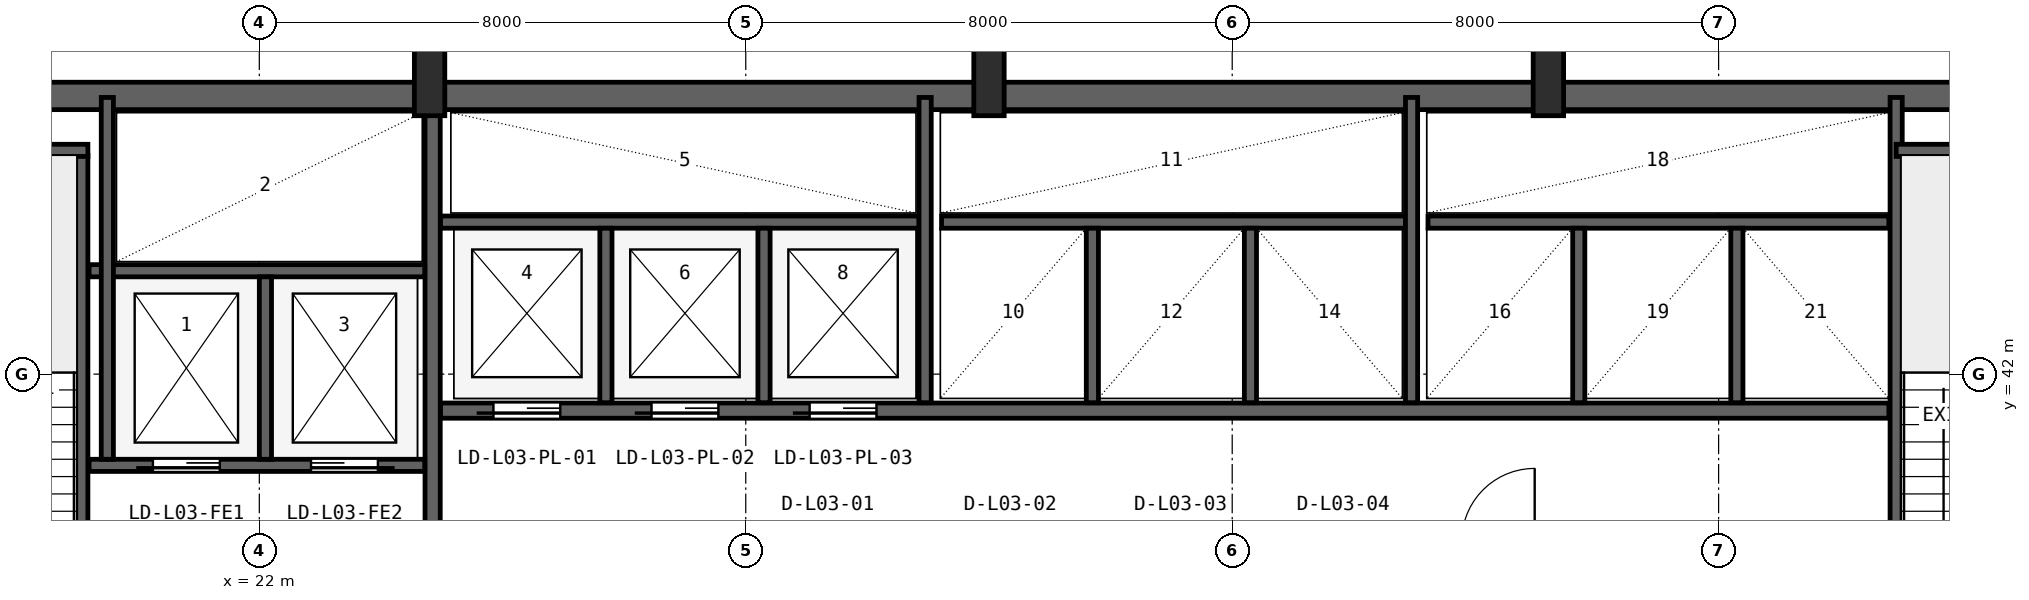
"""IFC4 building model, lengths in metres.
Left out: names, types, materials, properties, quantities, classifications, styles, units other than length and angle.
Written with IfcOpenShell. Run it as: python <this file> out.ifc"""

import sys

from ifc_helpers import new_model, si_unit, direction, frame, frame_2d, origin, origin_2d, place, context, subcontext, project, spatial, rectangle, i_section, extrude, source, transform, mapped, element, fill, save


model = new_model("IFC4")
c1 = context("Model", 3, precision=1e-05, world=origin(), true_north=direction((0.0, 1.0)))
c2 = subcontext(c1, "Body", "Model", "MODEL_VIEW")
j1 = project(units=[si_unit("LENGTHUNIT", "METRE"), si_unit("PLANEANGLEUNIT", "RADIAN")], contexts=[c1])
p1 = place(None, origin())
s1 = spatial("IfcSite", under=j1, at=p1, CompositionType="ELEMENT")
p2 = place(p1, origin())
s2 = spatial("IfcBuilding", under=s1, at=p2, CompositionType="ELEMENT")
p3 = place(p2, frame((0.0, 0.0, 16.8)))
s3 = spatial("IfcBuildingStorey", under=s2, at=p3, CompositionType="ELEMENT", Elevation=16.8)
p4 = place(p3, frame((15.6, 46.575, 0.0), z_axis=(0.0, 0.0, 1.0), x_axis=(1.0, 0.0, 0.0)))
e1 = element("IfcWall", 1, at=p4, inside=s3, PredefinedType="SHEAR", context=c2, shape_type="SweptSolid", body=[
    extrude(rectangle(XDim=36.8, YDim=0.45, at=frame_2d((18.4, 0.0))), origin(), (0.0, 0.0, 1.0), 5.08),
])
m1 = source(origin(), c2, "Body", "SweptSolid", [
    extrude(i_section(OverallWidth=0.5, OverallDepth=1.1, WebThickness=0.018, FlangeThickness=0.032, FilletRadius=0.018, at=origin_2d()), origin(), (0.0, 0.0, 1.0), 5.4),
])
for number, where, z_axis, x_axis in (
    (2, (24.8, 46.8, 0.0), (0.0, 0.0, 1.0), (1.0, 0.0, 0.0)),
    (3, (34.0, 46.8, 0.0), (0.0, 0.0, 1.0), (1.0, 0.0, 0.0)),
    (4, (43.2, 46.8, 0.0), (0.0, 0.0, 1.0), (1.0, 0.0, 0.0)),
):
    element("IfcColumn", number, at=place(p3, frame(where, z_axis=z_axis, x_axis=x_axis)), inside=s3, PredefinedType="COLUMN", context=c2, shape_type="MappedRepresentation", body=[
        mapped(m1, transform((0.0, 0.0, 0.0), x_axis=(1.0, 0.0, 0.0), y_axis=(0.0, 1.0, 0.0), z_axis=(0.0, 0.0, 1.0), scale=1.0)),
    ])
p5 = place(p3, frame((19.08, 35.95, 0.0), z_axis=(0.0, 0.0, 1.0), x_axis=(0.0, 1.0, 0.0)))
e5 = element("IfcWall", 5, at=p5, inside=s3, PredefinedType="SHEAR", context=c2, shape_type="SweptSolid", body=[
    extrude(rectangle(XDim=9.65, YDim=0.2, at=frame_2d((4.825, 0.0))), origin(), (0.0, 0.0, 1.0), 5.08),
])
p6 = place(p5, frame((0.25, 0.0, 0.0)))
e6 = element("IfcOpeningElement", 6, at=p6, cuts=e5, PredefinedType="OPENING", context=c2, shape_type="SweptSolid", body=[
    extrude(rectangle(XDim=0.95, YDim=2.1, at=frame_2d((0.475, 1.05))), frame((0.0, 0.11, 0.0), z_axis=(0.0, -1.0, 0.0), x_axis=(1.0, 0.0, 0.0)), (0.0, 0.0, 1.0), 0.22),
])
p7 = place(p3, frame((15.95, 45.68, 0.0), z_axis=(0.0, 0.0, 1.0), x_axis=(1.0, 0.0, 0.0)))
e7 = element("IfcWall", 7, at=p7, inside=s3, PredefinedType="SHEAR", context=c2, shape_type="SweptSolid", body=[
    extrude(rectangle(XDim=3.23, YDim=0.2, at=frame_2d((1.615, 0.0))), origin(), (0.0, 0.0, 1.0), 5.08),
])
p8 = place(p3, frame((24.85, 36.05, 0.0), z_axis=(0.0, 0.0, 1.0), x_axis=(0.0, 1.0, 0.0)))
e8 = element("IfcWall", 8, at=p8, inside=s3, PredefinedType="SHEAR", context=c2, shape_type="SweptSolid", body=[
    extrude(rectangle(XDim=10.45, YDim=0.25, at=frame_2d((5.225, 0.0))), origin(), (0.0, 0.0, 1.0), 5.08),
])
p9 = place(p3, frame((19.2, 40.5, 0.0), z_axis=(0.0, 0.0, 1.0), x_axis=(1.0, 0.0, 0.0)))
e9 = element("IfcWall", 9, at=p9, inside=s3, PredefinedType="SHEAR", context=c2, shape_type="SweptSolid", body=[
    extrude(rectangle(XDim=5.52, YDim=0.2, at=frame_2d((2.76, 0.0))), origin(), (0.0, 0.0, 1.0), 5.08),
])
p10 = place(p9, frame((1.05, 0.0, 0.0)))
e10 = element("IfcOpeningElement", 10, at=p10, cuts=e9, PredefinedType="OPENING", context=c2, shape_type="SweptSolid", body=[
    extrude(rectangle(XDim=1.1, YDim=2.18, at=frame_2d((0.55, 1.09))), frame((0.0, 0.11, 0.0), z_axis=(0.0, -1.0, 0.0), x_axis=(1.0, 0.0, 0.0)), (0.0, 0.0, 1.0), 0.22),
])
p11 = place(p9, frame((3.65, 0.0, 0.0)))
e11 = element("IfcOpeningElement", 11, at=p11, cuts=e9, PredefinedType="OPENING", context=c2, shape_type="SweptSolid", body=[
    extrude(rectangle(XDim=1.1, YDim=2.18, at=frame_2d((0.55, 1.09))), frame((0.0, 0.11, 0.0), z_axis=(0.0, -1.0, 0.0), x_axis=(1.0, 0.0, 0.0)), (0.0, 0.0, 1.0), 0.22),
])
p12 = place(p3, frame((19.2, 43.7, 0.0), z_axis=(0.0, 0.0, 1.0), x_axis=(1.0, 0.0, 0.0)))
e12 = element("IfcWall", 12, at=p12, inside=s3, PredefinedType="SHEAR", context=c2, shape_type="SweptSolid", body=[
    extrude(rectangle(XDim=5.52, YDim=0.2, at=frame_2d((2.76, 0.0))), origin(), (0.0, 0.0, 1.0), 5.08),
])
p13 = place(p3, frame((22.1, 40.6, 0.0), z_axis=(0.0, 0.0, 1.0), x_axis=(0.0, 1.0, 0.0)))
e13 = element("IfcWall", 13, at=p13, inside=s3, PredefinedType="SHEAR", context=c2, shape_type="SweptSolid", body=[
    extrude(rectangle(XDim=3.0, YDim=0.2, at=frame_2d((1.5, 0.0))), origin(), (0.0, 0.0, 1.0), 5.08),
])
p14 = place(p3, frame((19.5, 40.6, 0.0), z_axis=(0.0, 0.0, 1.0), x_axis=(0.0, 1.0, 0.0)))
e14 = element("IfcWall", 14, at=p14, inside=s3, PredefinedType="SHEAR", context=c2, shape_type="SweptSolid", body=[
    extrude(rectangle(XDim=5.95, YDim=0.2, at=frame_2d((2.975, 0.0))), origin(), (0.0, 0.0, 1.0), 5.08),
])
p15 = place(p3, frame((48.92, 36.05, 0.0), z_axis=(0.0, 0.0, 1.0), x_axis=(0.0, 1.0, 0.0)))
e15 = element("IfcWall", 15, at=p15, inside=s3, PredefinedType="SHEAR", context=c2, shape_type="SweptSolid", body=[
    extrude(rectangle(XDim=10.5, YDim=0.2, at=frame_2d((5.25, 0.0))), origin(), (0.0, 0.0, 1.0), 5.08),
])
p16 = place(p3, frame((48.92, 45.68, 0.0), z_axis=(0.0, 0.0, 1.0), x_axis=(1.0, 0.0, 0.0)))
e16 = element("IfcWall", 16, at=p16, inside=s3, PredefinedType="SHEAR", context=c2, shape_type="SweptSolid", body=[
    extrude(rectangle(XDim=3.18, YDim=0.2, at=frame_2d((1.59, 0.0))), origin(), (0.0, 0.0, 1.0), 5.08),
])
p17 = place(p3, frame((24.98, 41.4, 0.0), z_axis=(0.0, 0.0, 1.0), x_axis=(1.0, 0.0, 0.0)))
e17 = element("IfcWall", 17, at=p17, inside=s3, PredefinedType="SHEAR", context=c2, shape_type="SweptSolid", body=[
    extrude(rectangle(XDim=23.82, YDim=0.25, at=frame_2d((11.91, 0.0))), origin(), (0.0, 0.0, 1.0), 5.08),
])
p18 = place(p17, frame((0.87, 0.0, 0.0)))
e18 = element("IfcOpeningElement", 18, at=p18, cuts=e17, PredefinedType="OPENING", context=c2, shape_type="SweptSolid", body=[
    extrude(rectangle(XDim=1.1, YDim=2.18, at=frame_2d((0.55, 1.09))), frame((0.0, 0.135, 0.0), z_axis=(0.0, -1.0, 0.0), x_axis=(1.0, 0.0, 0.0)), (0.0, 0.0, 1.0), 0.27),
])
p19 = place(p17, frame((3.47, 0.0, 0.0)))
e19 = element("IfcOpeningElement", 19, at=p19, cuts=e17, PredefinedType="OPENING", context=c2, shape_type="SweptSolid", body=[
    extrude(rectangle(XDim=1.1, YDim=2.18, at=frame_2d((0.55, 1.09))), frame((0.0, 0.135, 0.0), z_axis=(0.0, -1.0, 0.0), x_axis=(1.0, 0.0, 0.0)), (0.0, 0.0, 1.0), 0.27),
])
p20 = place(p17, frame((6.07, 0.0, 0.0)))
e20 = element("IfcOpeningElement", 20, at=p20, cuts=e17, PredefinedType="OPENING", context=c2, shape_type="SweptSolid", body=[
    extrude(rectangle(XDim=1.1, YDim=2.18, at=frame_2d((0.55, 1.09))), frame((0.0, 0.135, 0.0), z_axis=(0.0, -1.0, 0.0), x_axis=(1.0, 0.0, 0.0)), (0.0, 0.0, 1.0), 0.27),
])
p21 = place(p3, frame((24.98, 44.5, 0.0), z_axis=(0.0, 0.0, 1.0), x_axis=(1.0, 0.0, 0.0)))
e21 = element("IfcWall", 21, at=p21, inside=s3, PredefinedType="SHEAR", context=c2, shape_type="SweptSolid", body=[
    extrude(rectangle(XDim=7.87, YDim=0.2, at=frame_2d((3.935, 0.0))), origin(), (0.0, 0.0, 1.0), 5.08),
])
for number, where, z_axis, x_axis in (
    (22, (27.7, 41.53, 0.0), (0.0, 0.0, 1.0), (0.0, 1.0, 0.0)),
    (23, (30.3, 41.53, 0.0), (0.0, 0.0, 1.0), (0.0, 1.0, 0.0)),
):
    element("IfcWall", number, at=place(p3, frame(where, z_axis=z_axis, x_axis=x_axis)), inside=s3, PredefinedType="SHEAR", context=c2, shape_type="SweptSolid", body=[
        extrude(rectangle(XDim=2.87, YDim=0.2, at=frame_2d((1.435, 0.0))), origin(), (0.0, 0.0, 1.0), 5.08),
    ])
p22 = place(p3, frame((32.95, 41.53, 0.0), z_axis=(0.0, 0.0, 1.0), x_axis=(0.0, 1.0, 0.0)))
e24 = element("IfcWall", 24, at=p22, inside=s3, PredefinedType="SHEAR", context=c2, shape_type="SweptSolid", body=[
    extrude(rectangle(XDim=5.02, YDim=0.2, at=frame_2d((2.51, 0.0))), origin(), (0.0, 0.0, 1.0), 5.08),
])
p23 = place(p3, frame((33.22, 44.5, 0.0), z_axis=(0.0, 0.0, 1.0), x_axis=(1.0, 0.0, 0.0)))
e25 = element("IfcWall", 25, at=p23, inside=s3, PredefinedType="SHEAR", context=c2, shape_type="SweptSolid", body=[
    extrude(rectangle(XDim=7.63, YDim=0.2, at=frame_2d((3.815, 0.0))), origin(), (0.0, 0.0, 1.0), 5.08),
])
for number, where, z_axis, x_axis in (
    (26, (35.7, 41.53, 0.0), (0.0, 0.0, 1.0), (0.0, 1.0, 0.0)),
    (27, (38.3, 41.53, 0.0), (0.0, 0.0, 1.0), (0.0, 1.0, 0.0)),
):
    element("IfcWall", number, at=place(p3, frame(where, z_axis=z_axis, x_axis=x_axis)), inside=s3, PredefinedType="SHEAR", context=c2, shape_type="SweptSolid", body=[
        extrude(rectangle(XDim=2.87, YDim=0.2, at=frame_2d((1.435, 0.0))), origin(), (0.0, 0.0, 1.0), 5.08),
    ])
p24 = place(p3, frame((40.95, 41.53, 0.0), z_axis=(0.0, 0.0, 1.0), x_axis=(0.0, 1.0, 0.0)))
e28 = element("IfcWall", 28, at=p24, inside=s3, PredefinedType="SHEAR", context=c2, shape_type="SweptSolid", body=[
    extrude(rectangle(XDim=5.02, YDim=0.2, at=frame_2d((2.51, 0.0))), origin(), (0.0, 0.0, 1.0), 5.08),
])
p25 = place(p3, frame((41.22, 44.5, 0.0), z_axis=(0.0, 0.0, 1.0), x_axis=(1.0, 0.0, 0.0)))
e29 = element("IfcWall", 29, at=p25, inside=s3, PredefinedType="SHEAR", context=c2, shape_type="SweptSolid", body=[
    extrude(rectangle(XDim=7.58, YDim=0.2, at=frame_2d((3.79, 0.0))), origin(), (0.0, 0.0, 1.0), 5.08),
])
for number, where, z_axis, x_axis in (
    (30, (43.7, 41.53, 0.0), (0.0, 0.0, 1.0), (0.0, 1.0, 0.0)),
    (31, (46.3, 41.53, 0.0), (0.0, 0.0, 1.0), (0.0, 1.0, 0.0)),
):
    element("IfcWall", number, at=place(p3, frame(where, z_axis=z_axis, x_axis=x_axis)), inside=s3, PredefinedType="SHEAR", context=c2, shape_type="SweptSolid", body=[
        extrude(rectangle(XDim=2.87, YDim=0.2, at=frame_2d((1.435, 0.0))), origin(), (0.0, 0.0, 1.0), 5.08),
    ])
m2 = source(origin(), c2, "Body", "SweptSolid", [
    extrude(rectangle(XDim=1.1, YDim=2.18, at=frame_2d((0.55, 1.09))), frame((0.0, 0.025, 0.0), z_axis=(0.0, -1.0, 0.0), x_axis=(1.0, 0.0, 0.0)), (0.0, 0.0, 1.0), 0.05),
])
p26 = place(p10, frame((1.1, 0.0, 0.0), z_axis=(0.0, 0.0, 1.0), x_axis=(-1.0, 0.0, 0.0)))
e32 = element("IfcDoor", 32, at=p26, inside=s3, OperationType="SLIDING_TO_LEFT", PredefinedType="DOOR", context=c2, shape_type="MappedRepresentation", body=[
    mapped(m2, transform((0.0, 0.0, 0.0), x_axis=(1.0, 0.0, 0.0), y_axis=(0.0, 1.0, 0.0), z_axis=(0.0, 0.0, 1.0), scale=1.0)),
])
fill(e10, e32)
p27 = place(p11, frame((1.1, 0.0, 0.0), z_axis=(0.0, 0.0, 1.0), x_axis=(-1.0, 0.0, 0.0)))
e33 = element("IfcDoor", 33, at=p27, inside=s3, OperationType="SLIDING_TO_RIGHT", PredefinedType="DOOR", context=c2, shape_type="MappedRepresentation", body=[
    mapped(m2, transform((0.0, 0.0, 0.0), x_axis=(1.0, 0.0, 0.0), y_axis=(0.0, 1.0, 0.0), z_axis=(0.0, 0.0, 1.0), scale=1.0)),
])
fill(e11, e33)
p28 = place(p18, frame((1.1, 0.0, 0.0), z_axis=(0.0, 0.0, 1.0), x_axis=(-1.0, 0.0, 0.0)))
e34 = element("IfcDoor", 34, at=p28, inside=s3, OperationType="SLIDING_TO_LEFT", PredefinedType="DOOR", context=c2, shape_type="MappedRepresentation", body=[
    mapped(m2, transform((0.0, 0.0, 0.0), x_axis=(1.0, 0.0, 0.0), y_axis=(0.0, 1.0, 0.0), z_axis=(0.0, 0.0, 1.0), scale=1.0)),
])
fill(e18, e34)
p29 = place(p19, frame((1.1, 0.0, 0.0), z_axis=(0.0, 0.0, 1.0), x_axis=(-1.0, 0.0, 0.0)))
e35 = element("IfcDoor", 35, at=p29, inside=s3, OperationType="SLIDING_TO_LEFT", PredefinedType="DOOR", context=c2, shape_type="MappedRepresentation", body=[
    mapped(m2, transform((0.0, 0.0, 0.0), x_axis=(1.0, 0.0, 0.0), y_axis=(0.0, 1.0, 0.0), z_axis=(0.0, 0.0, 1.0), scale=1.0)),
])
fill(e19, e35)
p30 = place(p20, frame((1.1, 0.0, 0.0), z_axis=(0.0, 0.0, 1.0), x_axis=(-1.0, 0.0, 0.0)))
e36 = element("IfcDoor", 36, at=p30, inside=s3, OperationType="SLIDING_TO_LEFT", PredefinedType="DOOR", context=c2, shape_type="MappedRepresentation", body=[
    mapped(m2, transform((0.0, 0.0, 0.0), x_axis=(1.0, 0.0, 0.0), y_axis=(0.0, 1.0, 0.0), z_axis=(0.0, 0.0, 1.0), scale=1.0)),
])
fill(e20, e36)
save(model, sys.argv[1])
